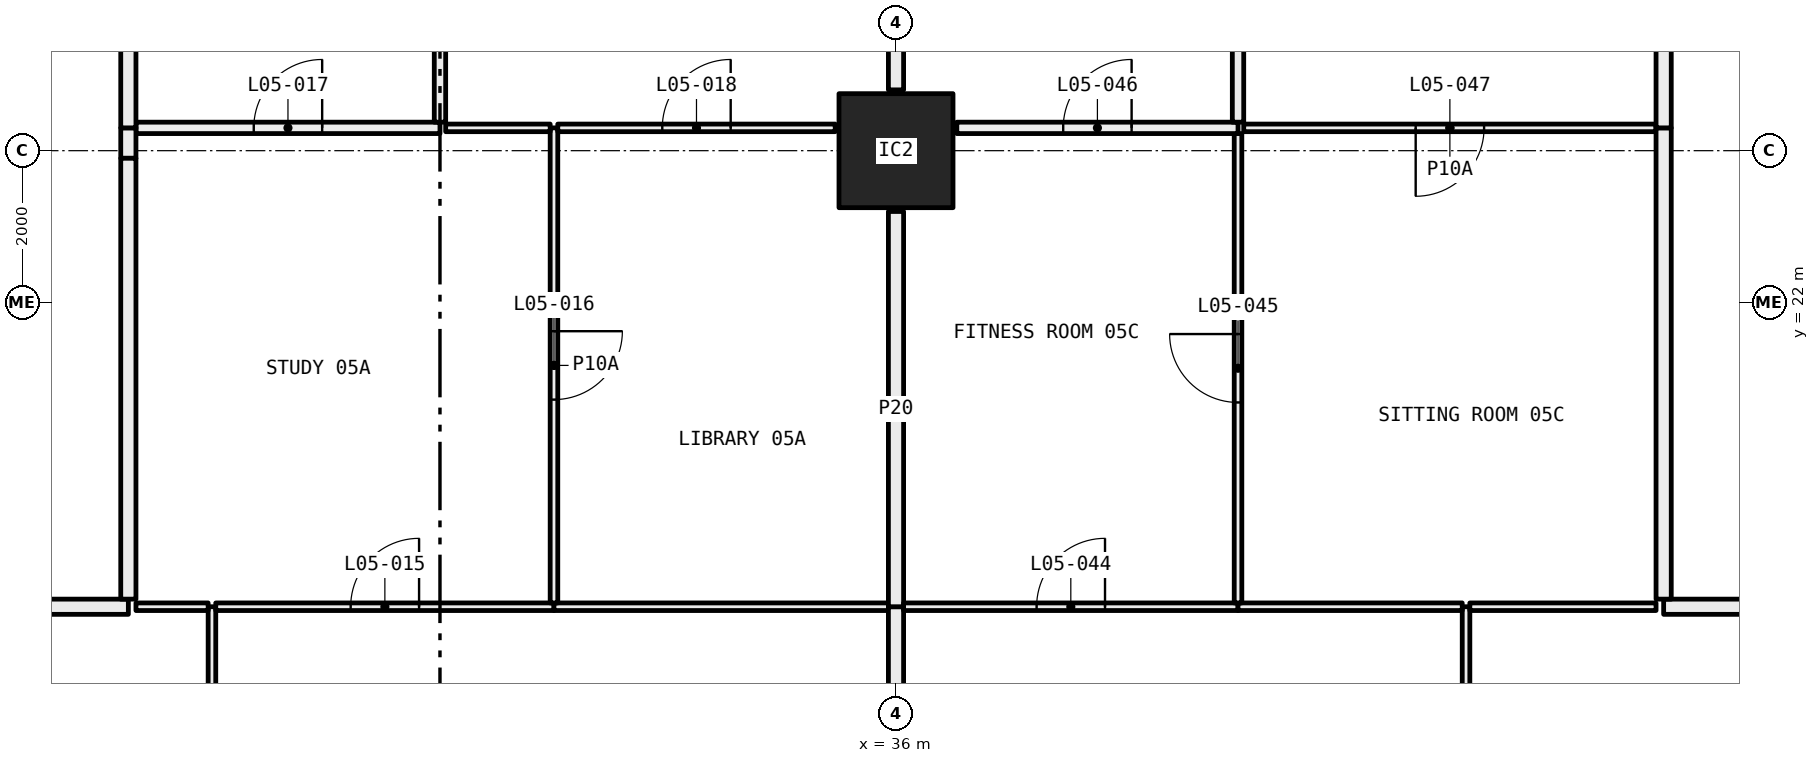
"""IFC4 building model, lengths in metres.
Left out: names, types, materials, properties, quantities, classifications, styles, units other than length and angle.
Written with IfcOpenShell. Run it as: python <this file> out.ifc"""

import sys

from ifc_helpers import new_model, si_unit, direction, frame, frame_2d, origin, origin_2d, place, context, subcontext, project, spatial, rectangle, hollow_rectangle, extrude, element, fill, save


model = new_model("IFC4")
c1 = context("Model", 3, precision=1e-05, world=origin(), true_north=direction((0.0, 1.0)))
c2 = subcontext(c1, "Body", "Model", "MODEL_VIEW")
j1 = project(units=[si_unit("LENGTHUNIT", "METRE"), si_unit("PLANEANGLEUNIT", "RADIAN")], contexts=[c1])
p1 = place(None, origin())
s1 = spatial("IfcSite", under=j1, at=p1, CompositionType="ELEMENT")
p2 = place(p1, origin())
s2 = spatial("IfcBuilding", under=s1, at=p2, CompositionType="ELEMENT")
p3 = place(p2, frame((0.0, 0.0, 30.0)))
s3 = spatial("IfcBuildingStorey", under=s2, at=p3, CompositionType="ELEMENT", Elevation=30.0)
p4 = place(p3, frame((36.0, 24.0, 0.0), z_axis=(0.0, 0.0, 1.0), x_axis=(1.0, 0.0, 0.0)))
e1 = element("IfcColumn", 1, at=p4, inside=s3, PredefinedType="COLUMN", context=c2, shape_type="SweptSolid", body=[
    extrude(hollow_rectangle(XDim=1.5, YDim=1.5, WallThickness=0.065, at=origin_2d()), origin(), (0.0, 0.0, 1.0), 3.05),
])
p5 = place(p3, frame((27.0, 12.05, 0.0), z_axis=(0.0, 0.0, 1.0), x_axis=(0.0, 1.0, 0.0)))
e2 = element("IfcWall", 2, at=p5, inside=s3, PredefinedType="PARTITIONING", context=c2, shape_type="SweptSolid", body=[
    extrude(rectangle(XDim=5.95, YDim=0.1, at=frame_2d((2.975, 0.0))), origin(), (0.0, 0.0, 1.0), 2.45),
])
p6 = place(p3, frame((26.95, 18.0, 0.0), z_axis=(0.0, 0.0, 1.0), x_axis=(-1.0, 0.0, 0.0)))
e3 = element("IfcWall", 3, at=p6, inside=s3, PredefinedType="PARTITIONING", context=c2, shape_type="SweptSolid", body=[
    extrude(rectangle(XDim=0.95, YDim=0.1, at=frame_2d((0.475, 0.0))), origin(), (0.0, 0.0, 1.0), 3.05),
])
p7 = place(p3, frame((25.9, 18.0, 0.0), z_axis=(0.0, 0.0, 1.0), x_axis=(-1.0, 0.0, 0.0)))
e4 = element("IfcWall", 4, at=p7, inside=s3, PredefinedType="PARTITIONING", context=c2, shape_type="SweptSolid", body=[
    extrude(rectangle(XDim=7.9, YDim=0.2, at=frame_2d((3.95, 0.0))), origin(), (0.0, 0.0, 1.0), 3.05),
])
p8 = place(p3, frame((31.5, 18.0, 0.0), z_axis=(0.0, 0.0, 1.0), x_axis=(-1.0, 0.0, 0.0)))
e5 = element("IfcWall", 5, at=p8, inside=s3, PredefinedType="PARTITIONING", context=c2, shape_type="SweptSolid", body=[
    extrude(rectangle(XDim=4.45, YDim=0.1, at=frame_2d((2.225, 0.0))), origin(), (0.0, 0.0, 1.0), 3.05),
])
p9 = place(p8, frame((1.775, 0.0, 0.0)))
e6 = element("IfcOpeningElement", 6, at=p9, cuts=e5, PredefinedType="OPENING", context=c2, shape_type="SweptSolid", body=[
    extrude(rectangle(XDim=0.9, YDim=2.1, at=frame_2d((0.45, 1.05))), frame((0.0, 0.06, 0.0), z_axis=(0.0, -1.0, 0.0), x_axis=(1.0, 0.0, 0.0)), (0.0, 0.0, 1.0), 0.12),
])
p10 = place(p3, frame((35.9, 18.0, 0.0), z_axis=(0.0, 0.0, 1.0), x_axis=(-1.0, 0.0, 0.0)))
e7 = element("IfcWall", 7, at=p10, inside=s3, PredefinedType="PARTITIONING", context=c2, shape_type="SweptSolid", body=[
    extrude(rectangle(XDim=4.4, YDim=0.1, at=frame_2d((2.2, 0.0))), origin(), (0.0, 0.0, 1.0), 3.05),
])
p11 = place(p3, frame((36.0, 12.8, 0.0), z_axis=(0.0, 0.0, 1.0), x_axis=(0.0, 1.0, 0.0)))
e8 = element("IfcWall", 8, at=p11, inside=s3, PredefinedType="PARTITIONING", context=c2, shape_type="SweptSolid", body=[
    extrude(rectangle(XDim=5.2, YDim=0.2, at=frame_2d((2.6, 0.0))), origin(), (0.0, 0.0, 1.0), 2.45),
])
p12 = place(p3, frame((31.5, 18.05, 0.0), z_axis=(0.0, 0.0, 1.0), x_axis=(0.0, 1.0, 0.0)))
e9 = element("IfcWall", 9, at=p12, inside=s3, PredefinedType="PARTITIONING", context=c2, shape_type="SweptSolid", body=[
    extrude(rectangle(XDim=6.25, YDim=0.1, at=frame_2d((3.125, 0.0))), origin(), (0.0, 0.0, 1.0), 2.45),
])
p13 = place(p12, frame((2.675, 0.0, 0.0)))
e10 = element("IfcOpeningElement", 10, at=p13, cuts=e9, PredefinedType="OPENING", context=c2, shape_type="SweptSolid", body=[
    extrude(rectangle(XDim=0.9, YDim=2.1, at=frame_2d((0.45, 1.05))), frame((0.0, 0.06, 0.0), z_axis=(0.0, -1.0, 0.0), x_axis=(1.0, 0.0, 0.0)), (0.0, 0.0, 1.0), 0.12),
])
p14 = place(p3, frame((30.0, 24.3, 0.0), z_axis=(0.0, 0.0, 1.0), x_axis=(-1.0, 0.0, 0.0)))
e11 = element("IfcWall", 11, at=p14, inside=s3, PredefinedType="PARTITIONING", context=c2, shape_type="SweptSolid", body=[
    extrude(rectangle(XDim=4.0, YDim=0.15, at=frame_2d((2.0, 0.0))), origin(), (0.0, 0.0, 1.0), 3.05),
])
p15 = place(p14, frame((1.55, 0.0, 0.0)))
e12 = element("IfcOpeningElement", 12, at=p15, cuts=e11, PredefinedType="OPENING", context=c2, shape_type="SweptSolid", body=[
    extrude(rectangle(XDim=0.9, YDim=2.1, at=frame_2d((0.45, 1.05))), frame((0.0, 0.085, 0.0), z_axis=(0.0, -1.0, 0.0), x_axis=(1.0, 0.0, 0.0)), (0.0, 0.0, 1.0), 0.17),
])
p16 = place(p3, frame((31.45, 24.3, 0.0), z_axis=(0.0, 0.0, 1.0), x_axis=(-1.0, 0.0, 0.0)))
e13 = element("IfcWall", 13, at=p16, inside=s3, PredefinedType="PARTITIONING", context=c2, shape_type="SweptSolid", body=[
    extrude(rectangle(XDim=1.375, YDim=0.1, at=frame_2d((0.688, 0.0))), origin(), (0.0, 0.0, 1.0), 3.05),
])
p17 = place(p3, frame((25.9, 24.3, 0.0), z_axis=(0.0, 0.0, 1.0), x_axis=(0.0, -1.0, 0.0)))
e14 = element("IfcWall", 14, at=p17, inside=s3, PredefinedType="PARTITIONING", context=c2, shape_type="SweptSolid", body=[
    extrude(rectangle(XDim=0.4, YDim=0.2, at=frame_2d((0.2, 0.0))), origin(), (0.0, 0.0, 1.0), 2.45),
])
p18 = place(p3, frame((25.9, 23.9, 0.0), z_axis=(0.0, 0.0, 1.0), x_axis=(0.0, -1.0, 0.0)))
e15 = element("IfcWall", 15, at=p18, inside=s3, PredefinedType="PARTITIONING", context=c2, shape_type="SweptSolid", body=[
    extrude(rectangle(XDim=5.8, YDim=0.2, at=frame_2d((2.9, 0.0))), origin(), (0.0, 0.0, 1.0), 3.05),
])
p19 = place(p3, frame((35.2, 24.3, 0.0), z_axis=(0.0, 0.0, 1.0), x_axis=(-1.0, 0.0, 0.0)))
e16 = element("IfcWall", 16, at=p19, inside=s3, PredefinedType="PARTITIONING", context=c2, shape_type="SweptSolid", body=[
    extrude(rectangle(XDim=3.65, YDim=0.1, at=frame_2d((1.825, 0.0))), origin(), (0.0, 0.0, 1.0), 3.05),
])
p20 = place(p19, frame((1.375, 0.0, 0.0)))
e17 = element("IfcOpeningElement", 17, at=p20, cuts=e16, PredefinedType="OPENING", context=c2, shape_type="SweptSolid", body=[
    extrude(rectangle(XDim=0.9, YDim=2.1, at=frame_2d((0.45, 1.05))), frame((0.0, 0.06, 0.0), z_axis=(0.0, -1.0, 0.0), x_axis=(1.0, 0.0, 0.0)), (0.0, 0.0, 1.0), 0.12),
])
p21 = place(p3, frame((36.0, 18.0, 0.0), z_axis=(0.0, 0.0, 1.0), x_axis=(0.0, 1.0, 0.0)))
e18 = element("IfcWall", 18, at=p21, inside=s3, PredefinedType="PARTITIONING", context=c2, shape_type="SweptSolid", body=[
    extrude(rectangle(XDim=5.2, YDim=0.2, at=frame_2d((2.6, 0.0))), origin(), (0.0, 0.0, 1.0), 2.45),
])
p22 = place(p3, frame((30.0, 24.375, 0.0), z_axis=(0.0, 0.0, 1.0), x_axis=(0.0, 1.0, 0.0)))
e19 = element("IfcWall", 19, at=p22, inside=s3, PredefinedType="PARTITIONING", context=c2, shape_type="SweptSolid", body=[
    extrude(rectangle(XDim=4.325, YDim=0.15, at=frame_2d((2.163, 0.0))), origin(), (0.0, 0.0, 1.0), 3.05),
])
p23 = place(p3, frame((25.9, 28.7, 0.0), z_axis=(0.0, 0.0, 1.0), x_axis=(0.0, -1.0, 0.0)))
e20 = element("IfcWall", 20, at=p23, inside=s3, PredefinedType="PARTITIONING", context=c2, shape_type="SweptSolid", body=[
    extrude(rectangle(XDim=4.4, YDim=0.2, at=frame_2d((2.2, 0.0))), origin(), (0.0, 0.0, 1.0), 3.05),
])
p24 = place(p3, frame((36.0, 24.8, 0.0), z_axis=(0.0, 0.0, 1.0), x_axis=(0.0, 1.0, 0.0)))
e21 = element("IfcWall", 21, at=p24, inside=s3, PredefinedType="PARTITIONING", context=c2, shape_type="SweptSolid", body=[
    extrude(rectangle(XDim=4.0, YDim=0.2, at=frame_2d((2.0, 0.0))), origin(), (0.0, 0.0, 1.0), 2.45),
])
p25 = place(p3, frame((43.5, 12.05, 0.0), z_axis=(0.0, 0.0, 1.0), x_axis=(0.0, 1.0, 0.0)))
e22 = element("IfcWall", 22, at=p25, inside=s3, PredefinedType="PARTITIONING", context=c2, shape_type="SweptSolid", body=[
    extrude(rectangle(XDim=5.95, YDim=0.1, at=frame_2d((2.975, 0.0))), origin(), (0.0, 0.0, 1.0), 2.45),
])
p26 = place(p3, frame((40.5, 18.0, 0.0), z_axis=(0.0, 0.0, 1.0), x_axis=(-1.0, 0.0, 0.0)))
e23 = element("IfcWall", 23, at=p26, inside=s3, PredefinedType="PARTITIONING", context=c2, shape_type="SweptSolid", body=[
    extrude(rectangle(XDim=4.4, YDim=0.1, at=frame_2d((2.2, 0.0))), origin(), (0.0, 0.0, 1.0), 3.05),
])
p27 = place(p26, frame((1.75, 0.0, 0.0)))
e24 = element("IfcOpeningElement", 24, at=p27, cuts=e23, PredefinedType="OPENING", context=c2, shape_type="SweptSolid", body=[
    extrude(rectangle(XDim=0.9, YDim=2.1, at=frame_2d((0.45, 1.05))), frame((0.0, 0.06, 0.0), z_axis=(0.0, -1.0, 0.0), x_axis=(1.0, 0.0, 0.0)), (0.0, 0.0, 1.0), 0.12),
])
p28 = place(p3, frame((43.45, 18.0, 0.0), z_axis=(0.0, 0.0, 1.0), x_axis=(-1.0, 0.0, 0.0)))
e25 = element("IfcWall", 25, at=p28, inside=s3, PredefinedType="PARTITIONING", context=c2, shape_type="SweptSolid", body=[
    extrude(rectangle(XDim=2.95, YDim=0.1, at=frame_2d((1.475, 0.0))), origin(), (0.0, 0.0, 1.0), 3.05),
])
p29 = place(p3, frame((46.0, 18.0, 0.0), z_axis=(0.0, 0.0, 1.0), x_axis=(-1.0, 0.0, 0.0)))
e26 = element("IfcWall", 26, at=p29, inside=s3, PredefinedType="PARTITIONING", context=c2, shape_type="SweptSolid", body=[
    extrude(rectangle(XDim=2.45, YDim=0.1, at=frame_2d((1.225, 0.0))), origin(), (0.0, 0.0, 1.0), 3.05),
])
p30 = place(p3, frame((51.0, 18.0, 0.0), z_axis=(0.0, 0.0, 1.0), x_axis=(-1.0, 0.0, 0.0)))
e27 = element("IfcWall", 27, at=p30, inside=s3, PredefinedType="PARTITIONING", context=c2, shape_type="SweptSolid", body=[
    extrude(rectangle(XDim=4.9, YDim=0.2, at=frame_2d((2.45, 0.0))), origin(), (0.0, 0.0, 1.0), 3.05),
])
p31 = place(p3, frame((40.5, 18.05, 0.0), z_axis=(0.0, 0.0, 1.0), x_axis=(0.0, 1.0, 0.0)))
e28 = element("IfcWall", 28, at=p31, inside=s3, PredefinedType="PARTITIONING", context=c2, shape_type="SweptSolid", body=[
    extrude(rectangle(XDim=6.175, YDim=0.1, at=frame_2d((3.087, 0.0))), origin(), (0.0, 0.0, 1.0), 2.45),
])
p32 = place(p31, frame((2.637, 0.0, 0.0)))
e29 = element("IfcOpeningElement", 29, at=p32, cuts=e28, PredefinedType="OPENING", context=c2, shape_type="SweptSolid", body=[
    extrude(rectangle(XDim=0.9, YDim=2.1, at=frame_2d((0.45, 1.05))), frame((0.0, 0.06, 0.0), z_axis=(0.0, -1.0, 0.0), x_axis=(1.0, 0.0, 0.0)), (0.0, 0.0, 1.0), 0.12),
])
p33 = place(p3, frame((40.5, 24.3, 0.0), z_axis=(0.0, 0.0, 1.0), x_axis=(-1.0, 0.0, 0.0)))
e30 = element("IfcWall", 30, at=p33, inside=s3, PredefinedType="PARTITIONING", context=c2, shape_type="SweptSolid", body=[
    extrude(rectangle(XDim=3.7, YDim=0.15, at=frame_2d((1.85, 0.0))), origin(), (0.0, 0.0, 1.0), 3.05),
])
p34 = place(p33, frame((1.4, 0.0, 0.0)))
e31 = element("IfcOpeningElement", 31, at=p34, cuts=e30, PredefinedType="OPENING", context=c2, shape_type="SweptSolid", body=[
    extrude(rectangle(XDim=0.9, YDim=2.1, at=frame_2d((0.45, 1.05))), frame((0.0, 0.085, 0.0), z_axis=(0.0, -1.0, 0.0), x_axis=(1.0, 0.0, 0.0)), (0.0, 0.0, 1.0), 0.17),
])
p35 = place(p3, frame((46.0, 24.3, 0.0), z_axis=(0.0, 0.0, 1.0), x_axis=(-1.0, 0.0, 0.0)))
e32 = element("IfcWall", 32, at=p35, inside=s3, PredefinedType="PARTITIONING", context=c2, shape_type="SweptSolid", body=[
    extrude(rectangle(XDim=5.425, YDim=0.1, at=frame_2d((2.712, 0.0))), origin(), (0.0, 0.0, 1.0), 3.05),
])
p36 = place(p35, frame((2.262, 0.0, 0.0)))
e33 = element("IfcOpeningElement", 33, at=p36, cuts=e32, PredefinedType="OPENING", context=c2, shape_type="SweptSolid", body=[
    extrude(rectangle(XDim=0.9, YDim=2.1, at=frame_2d((0.45, 1.05))), frame((0.0, 0.06, 0.0), z_axis=(0.0, -1.0, 0.0), x_axis=(1.0, 0.0, 0.0)), (0.0, 0.0, 1.0), 0.12),
])
p37 = place(p3, frame((46.1, 18.1, 0.0), z_axis=(0.0, 0.0, 1.0), x_axis=(0.0, 1.0, 0.0)))
e34 = element("IfcWall", 34, at=p37, inside=s3, PredefinedType="PARTITIONING", context=c2, shape_type="SweptSolid", body=[
    extrude(rectangle(XDim=6.2, YDim=0.2, at=frame_2d((3.1, 0.0))), origin(), (0.0, 0.0, 1.0), 2.45),
])
p38 = place(p3, frame((40.5, 24.375, 0.0), z_axis=(0.0, 0.0, 1.0), x_axis=(0.0, 1.0, 0.0)))
e35 = element("IfcWall", 35, at=p38, inside=s3, PredefinedType="PARTITIONING", context=c2, shape_type="SweptSolid", body=[
    extrude(rectangle(XDim=4.325, YDim=0.15, at=frame_2d((2.163, 0.0))), origin(), (0.0, 0.0, 1.0), 3.05),
])
p39 = place(p3, frame((46.1, 24.3, 0.0), z_axis=(0.0, 0.0, 1.0), x_axis=(0.0, 1.0, 0.0)))
e36 = element("IfcWall", 36, at=p39, inside=s3, PredefinedType="PARTITIONING", context=c2, shape_type="SweptSolid", body=[
    extrude(rectangle(XDim=4.5, YDim=0.2, at=frame_2d((2.25, 0.0))), origin(), (0.0, 0.0, 1.0), 3.05),
])
p40 = place(p9, frame((0.9, 0.0, 0.0), x_axis=(-1.0, 0.0, 0.0)))
e37 = element("IfcDoor", 37, at=p40, inside=s3, OperationType="SINGLE_SWING_LEFT", PredefinedType="DOOR", context=c2, shape_type="SweptSolid", body=[
    extrude(rectangle(XDim=0.9, YDim=2.1, at=frame_2d((0.45, 1.05))), frame((0.0, 0.025, 0.0), z_axis=(0.0, -1.0, 0.0), x_axis=(1.0, 0.0, 0.0)), (0.0, 0.0, 1.0), 0.05),
])
fill(e6, e37)
p41 = place(p13, frame((0.9, 0.0, 0.0), x_axis=(-1.0, 0.0, 0.0)))
e38 = element("IfcDoor", 38, at=p41, inside=s3, OperationType="SINGLE_SWING_RIGHT", PredefinedType="DOOR", context=c2, shape_type="SweptSolid", body=[
    extrude(rectangle(XDim=0.9, YDim=2.1, at=frame_2d((0.45, 1.05))), frame((0.0, 0.025, 0.0), z_axis=(0.0, -1.0, 0.0), x_axis=(1.0, 0.0, 0.0)), (0.0, 0.0, 1.0), 0.05),
])
fill(e10, e38)
p42 = place(p15, frame((0.9, 0.0, 0.0), x_axis=(-1.0, 0.0, 0.0)))
e39 = element("IfcDoor", 39, at=p42, inside=s3, OperationType="SINGLE_SWING_LEFT", PredefinedType="DOOR", context=c2, shape_type="SweptSolid", body=[
    extrude(rectangle(XDim=0.9, YDim=2.1, at=frame_2d((0.45, 1.05))), frame((0.0, 0.025, 0.0), z_axis=(0.0, -1.0, 0.0), x_axis=(1.0, 0.0, 0.0)), (0.0, 0.0, 1.0), 0.05),
])
fill(e12, e39)
p43 = place(p20, frame((0.9, 0.0, 0.0), x_axis=(-1.0, 0.0, 0.0)))
e40 = element("IfcDoor", 40, at=p43, inside=s3, OperationType="SINGLE_SWING_LEFT", PredefinedType="DOOR", context=c2, shape_type="SweptSolid", body=[
    extrude(rectangle(XDim=0.9, YDim=2.1, at=frame_2d((0.45, 1.05))), frame((0.0, 0.025, 0.0), z_axis=(0.0, -1.0, 0.0), x_axis=(1.0, 0.0, 0.0)), (0.0, 0.0, 1.0), 0.05),
])
fill(e17, e40)
p44 = place(p27, frame((0.9, 0.0, 0.0), x_axis=(-1.0, 0.0, 0.0)))
e41 = element("IfcDoor", 41, at=p44, inside=s3, OperationType="SINGLE_SWING_LEFT", PredefinedType="DOOR", context=c2, shape_type="SweptSolid", body=[
    extrude(rectangle(XDim=0.9, YDim=2.1, at=frame_2d((0.45, 1.05))), frame((0.0, 0.025, 0.0), z_axis=(0.0, -1.0, 0.0), x_axis=(1.0, 0.0, 0.0)), (0.0, 0.0, 1.0), 0.05),
])
fill(e24, e41)
p45 = place(p32, origin())
e42 = element("IfcDoor", 42, at=p45, inside=s3, OperationType="SINGLE_SWING_LEFT", PredefinedType="DOOR", context=c2, shape_type="SweptSolid", body=[
    extrude(rectangle(XDim=0.9, YDim=2.1, at=frame_2d((0.45, 1.05))), frame((0.0, 0.025, 0.0), z_axis=(0.0, -1.0, 0.0), x_axis=(1.0, 0.0, 0.0)), (0.0, 0.0, 1.0), 0.05),
])
fill(e29, e42)
p46 = place(p34, frame((0.9, 0.0, 0.0), x_axis=(-1.0, 0.0, 0.0)))
e43 = element("IfcDoor", 43, at=p46, inside=s3, OperationType="SINGLE_SWING_LEFT", PredefinedType="DOOR", context=c2, shape_type="SweptSolid", body=[
    extrude(rectangle(XDim=0.9, YDim=2.1, at=frame_2d((0.45, 1.05))), frame((0.0, 0.025, 0.0), z_axis=(0.0, -1.0, 0.0), x_axis=(1.0, 0.0, 0.0)), (0.0, 0.0, 1.0), 0.05),
])
fill(e31, e43)
p47 = place(p36, origin())
e44 = element("IfcDoor", 44, at=p47, inside=s3, OperationType="SINGLE_SWING_LEFT", PredefinedType="DOOR", context=c2, shape_type="SweptSolid", body=[
    extrude(rectangle(XDim=0.9, YDim=2.1, at=frame_2d((0.45, 1.05))), frame((0.0, 0.025, 0.0), z_axis=(0.0, -1.0, 0.0), x_axis=(1.0, 0.0, 0.0)), (0.0, 0.0, 1.0), 0.05),
])
fill(e33, e44)
save(model, sys.argv[1])
